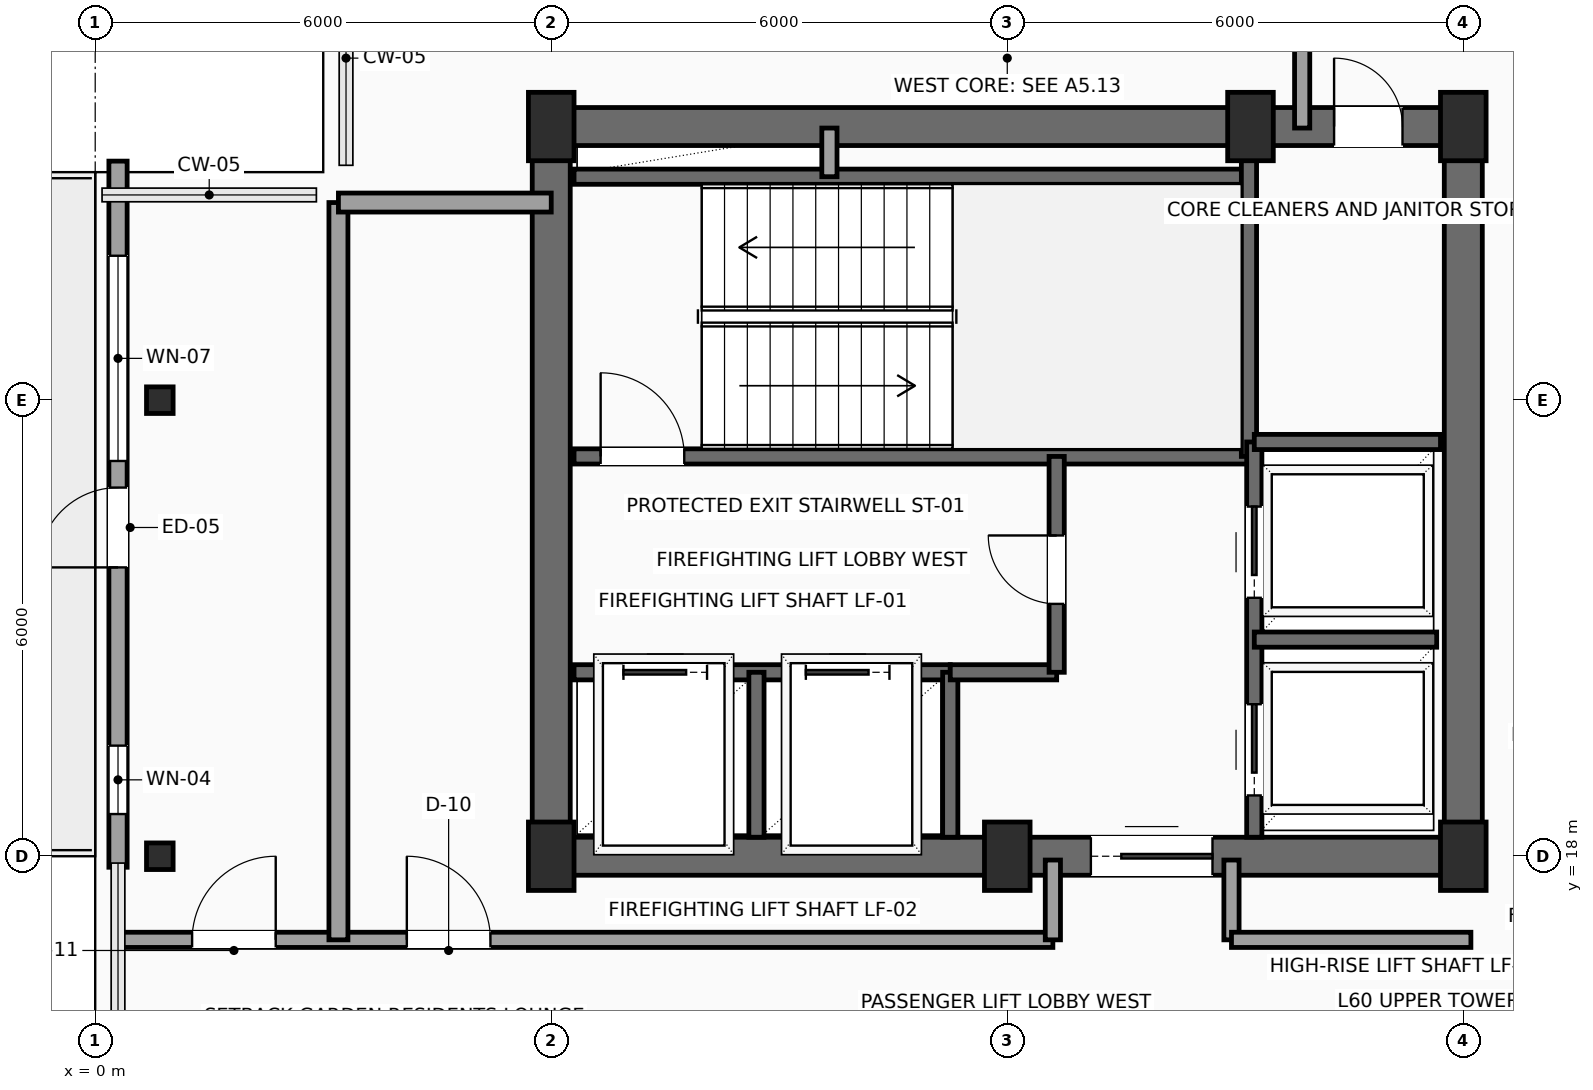
"""IFC4 building model, lengths in metres.
Left out: names, types, materials, properties, quantities, classifications, styles, units other than length and angle.
Written with IfcOpenShell. Run it as: python <this file> out.ifc"""

import sys

from ifc_helpers import new_model, si_unit, direction, frame, frame_2d, origin, origin_2d, place, context, subcontext, project, spatial, rectangle, hollow_rectangle, extrude, element, fill, save


model = new_model("IFC4")
c1 = context("Model", 3, precision=1e-05, world=origin(), true_north=direction((0.0, 1.0)))
c2 = subcontext(c1, "Body", "Model", "MODEL_VIEW")
j1 = project(units=[si_unit("LENGTHUNIT", "METRE"), si_unit("PLANEANGLEUNIT", "RADIAN")], contexts=[c1])
p1 = place(None, origin())
s1 = spatial("IfcSite", under=j1, at=p1, CompositionType="ELEMENT")
p2 = place(p1, origin())
s2 = spatial("IfcBuilding", under=s1, at=p2, CompositionType="ELEMENT")
p3 = place(p2, frame((0.0, 0.0, 243.2)))
s3 = spatial("IfcBuildingStorey", under=s2, at=p3, CompositionType="ELEMENT", Elevation=243.2)
for number, where, z_axis, x_axis in (
    (1, (6.0, 18.0, 0.0), (0.0, 0.0, 1.0), (1.0, 0.0, 0.0)),
    (2, (12.0, 18.0, 0.0), (0.0, 0.0, 1.0), (1.0, 0.0, 0.0)),
    (3, (18.0, 18.0, 0.0), (0.0, 0.0, 1.0), (1.0, 0.0, 0.0)),
    (4, (6.0, 27.6, 0.0), (0.0, 0.0, 1.0), (1.0, 0.0, 0.0)),
    (5, (15.2, 27.6, 0.0), (0.0, 0.0, 1.0), (1.0, 0.0, 0.0)),
    (6, (18.0, 27.6, 0.0), (0.0, 0.0, 1.0), (1.0, 0.0, 0.0)),
):
    element("IfcColumn", number, at=place(p3, frame(where, z_axis=z_axis, x_axis=x_axis)), inside=s3, PredefinedType="COLUMN", context=c2, shape_type="SweptSolid", body=[
        extrude(rectangle(XDim=0.6, YDim=0.9, at=origin_2d()), origin(), (0.0, 0.0, 1.0), 3.5),
    ])
for number, where, z_axis, x_axis in (
    (7, (0.85, 18.0, 0.0), (0.0, 0.0, 1.0), (1.0, 0.0, 0.0)),
    (8, (0.85, 24.0, 0.0), (0.0, 0.0, 1.0), (1.0, 0.0, 0.0)),
):
    element("IfcColumn", number, at=place(p3, frame(where, z_axis=z_axis, x_axis=x_axis)), inside=s3, PredefinedType="COLUMN", context=c2, shape_type="SweptSolid", body=[
        extrude(hollow_rectangle(XDim=0.35, YDim=0.35, WallThickness=0.016, InnerFilletRadius=0.016, OuterFilletRadius=0.032, at=origin_2d()), origin(), (0.0, 0.0, 1.0), 3.5),
    ])
p4 = place(p3, frame((0.3, 17.855, 0.0), z_axis=(0.0, 0.0, 1.0), x_axis=(0.0, 1.0, 0.0)))
e9 = element("IfcWall", 9, at=p4, inside=s3, PredefinedType="SOLIDWALL", context=c2, shape_type="SweptSolid", body=[
    extrude(rectangle(XDim=9.29, YDim=0.24, at=frame_2d((4.645, 0.0))), origin(), (0.0, 0.0, 1.0), 3.3),
])
p5 = place(p4, frame((3.945, 0.0, 0.0)))
e10 = element("IfcOpeningElement", 10, at=p5, cuts=e9, PredefinedType="OPENING", context=c2, shape_type="SweptSolid", body=[
    extrude(rectangle(XDim=1.05, YDim=2.2, at=frame_2d((0.525, 1.1))), frame((0.0, 0.13, 0.0), z_axis=(0.0, -1.0, 0.0), x_axis=(1.0, 0.0, 0.0)), (0.0, 0.0, 1.0), 0.26),
])
p6 = place(p4, frame((5.345, 0.0, 0.6)))
e11 = element("IfcOpeningElement", 11, at=p6, cuts=e9, PredefinedType="OPENING", context=c2, shape_type="SweptSolid", body=[
    extrude(rectangle(XDim=2.7, YDim=2.3, at=frame_2d((1.35, 1.15))), frame((0.0, 0.13, 0.0), z_axis=(0.0, -1.0, 0.0), x_axis=(1.0, 0.0, 0.0)), (0.0, 0.0, 1.0), 0.26),
])
p7 = place(p4, frame((0.7, 0.0, 0.6)))
e12 = element("IfcOpeningElement", 12, at=p7, cuts=e9, PredefinedType="OPENING", context=c2, shape_type="SweptSolid", body=[
    extrude(rectangle(XDim=0.9, YDim=2.2, at=frame_2d((0.45, 1.1))), frame((0.0, 0.13, 0.0), z_axis=(0.0, -1.0, 0.0), x_axis=(1.0, 0.0, 0.0)), (0.0, 0.0, 1.0), 0.26),
])
p8 = place(p3, frame((6.0, 18.0, 0.0), z_axis=(0.0, 0.0, 1.0), x_axis=(1.0, 0.0, 0.0)))
e13 = element("IfcWall", 13, at=p8, inside=s3, PredefinedType="SHEAR", context=c2, shape_type="SweptSolid", body=[
    extrude(rectangle(XDim=12.0, YDim=0.5, at=frame_2d((6.0, 0.0))), origin(), (0.0, 0.0, 1.0), 3.3),
])
p9 = place(p8, frame((7.1, 0.0, 0.0)))
e14 = element("IfcOpeningElement", 14, at=p9, cuts=e13, PredefinedType="OPENING", context=c2, shape_type="SweptSolid", body=[
    extrude(rectangle(XDim=1.6, YDim=2.3, at=frame_2d((0.8, 1.15))), frame((0.0, 0.26, 0.0), z_axis=(0.0, -1.0, 0.0), x_axis=(1.0, 0.0, 0.0)), (0.0, 0.0, 1.0), 0.52),
])
p10 = place(p3, frame((6.0, 27.6, 0.0), z_axis=(0.0, 0.0, 1.0), x_axis=(1.0, 0.0, 0.0)))
e15 = element("IfcWall", 15, at=p10, inside=s3, PredefinedType="SHEAR", context=c2, shape_type="SweptSolid", body=[
    extrude(rectangle(XDim=12.0, YDim=0.5, at=frame_2d((6.0, 0.0))), origin(), (0.0, 0.0, 1.0), 3.3),
])
p11 = place(p10, frame((10.3, 0.0, 0.0)))
e16 = element("IfcOpeningElement", 16, at=p11, cuts=e15, PredefinedType="OPENING", context=c2, shape_type="SweptSolid", body=[
    extrude(rectangle(XDim=0.9, YDim=2.15, at=frame_2d((0.45, 1.075))), frame((0.0, 0.26, 0.0), z_axis=(0.0, -1.0, 0.0), x_axis=(1.0, 0.0, 0.0)), (0.0, 0.0, 1.0), 0.52),
])
for number, where, z_axis, x_axis in (
    (17, (6.0, 18.0, 0.0), (0.0, 0.0, 1.0), (0.0, 1.0, 0.0)),
    (18, (18.0, 18.0, 0.0), (0.0, 0.0, 1.0), (0.0, 1.0, 0.0)),
):
    element("IfcWall", number, at=place(p3, frame(where, z_axis=z_axis, x_axis=x_axis)), inside=s3, PredefinedType="SHEAR", context=c2, shape_type="SweptSolid", body=[
        extrude(rectangle(XDim=9.6, YDim=0.5, at=frame_2d((4.8, 0.0))), origin(), (0.0, 0.0, 1.0), 3.3),
    ])
p12 = place(p3, frame((6.3, 23.26, 0.0), z_axis=(0.0, 0.0, 1.0), x_axis=(1.0, 0.0, 0.0)))
e19 = element("IfcWall", 19, at=p12, inside=s3, PredefinedType="SHEAR", context=c2, shape_type="SweptSolid", body=[
    extrude(rectangle(XDim=8.88, YDim=0.2, at=frame_2d((4.44, 0.0))), origin(), (0.0, 0.0, 1.0), 3.3),
])
p13 = place(p12, frame((0.35, 0.0, 0.0)))
e20 = element("IfcOpeningElement", 20, at=p13, cuts=e19, PredefinedType="OPENING", context=c2, shape_type="SweptSolid", body=[
    extrude(rectangle(XDim=1.1, YDim=2.2, at=frame_2d((0.55, 1.1))), frame((0.0, 0.11, 0.0), z_axis=(0.0, -1.0, 0.0), x_axis=(1.0, 0.0, 0.0)), (0.0, 0.0, 1.0), 0.22),
])
p14 = place(p3, frame((6.3, 26.94, 0.0), z_axis=(0.0, 0.0, 1.0), x_axis=(1.0, 0.0, 0.0)))
e21 = element("IfcWall", 21, at=p14, inside=s3, PredefinedType="SHEAR", context=c2, shape_type="SweptSolid", body=[
    extrude(rectangle(XDim=8.88, YDim=0.2, at=frame_2d((4.44, 0.0))), origin(), (0.0, 0.0, 1.0), 3.3),
])
p15 = place(p3, frame((15.18, 23.26, 0.0), z_axis=(0.0, 0.0, 1.0), x_axis=(0.0, 1.0, 0.0)))
e22 = element("IfcWall", 22, at=p15, inside=s3, PredefinedType="SHEAR", context=c2, shape_type="SweptSolid", body=[
    extrude(rectangle(XDim=4.04, YDim=0.2, at=frame_2d((2.02, 0.0))), origin(), (0.0, 0.0, 1.0), 3.3),
])
p16 = place(p3, frame((6.3, 20.42, 0.0), z_axis=(0.0, 0.0, 1.0), x_axis=(1.0, 0.0, 0.0)))
e23 = element("IfcWall", 23, at=p16, inside=s3, PredefinedType="SHEAR", context=c2, shape_type="SweptSolid", body=[
    extrude(rectangle(XDim=4.95, YDim=0.2, at=frame_2d((2.475, 0.0))), origin(), (0.0, 0.0, 1.0), 3.3),
])
p17 = place(p16, frame((0.65, 0.0, 0.0)))
e24 = element("IfcOpeningElement", 24, at=p17, cuts=e23, PredefinedType="OPENING", context=c2, shape_type="SweptSolid", body=[
    extrude(rectangle(XDim=1.1, YDim=2.2, at=frame_2d((0.55, 1.1))), frame((0.0, 0.11, 0.0), z_axis=(0.0, -1.0, 0.0), x_axis=(1.0, 0.0, 0.0)), (0.0, 0.0, 1.0), 0.22),
])
p18 = place(p16, frame((3.05, 0.0, 0.0)))
e25 = element("IfcOpeningElement", 25, at=p18, cuts=e23, PredefinedType="OPENING", context=c2, shape_type="SweptSolid", body=[
    extrude(rectangle(XDim=1.1, YDim=2.2, at=frame_2d((0.55, 1.1))), frame((0.0, 0.11, 0.0), z_axis=(0.0, -1.0, 0.0), x_axis=(1.0, 0.0, 0.0)), (0.0, 0.0, 1.0), 0.22),
])
for number, where, z_axis, x_axis in (
    (26, (8.7, 18.25, 0.0), (0.0, 0.0, 1.0), (0.0, 1.0, 0.0)),
    (27, (11.25, 18.25, 0.0), (0.0, 0.0, 1.0), (0.0, 1.0, 0.0)),
):
    element("IfcWall", number, at=place(p3, frame(where, z_axis=z_axis, x_axis=x_axis)), inside=s3, PredefinedType="SHEAR", context=c2, shape_type="SweptSolid", body=[
        extrude(rectangle(XDim=2.17, YDim=0.2, at=frame_2d((1.085, 0.0))), origin(), (0.0, 0.0, 1.0), 3.3),
    ])
p19 = place(p3, frame((11.25, 20.42, 0.0), z_axis=(0.0, 0.0, 1.0), x_axis=(1.0, 0.0, 0.0)))
e28 = element("IfcWall", 28, at=p19, inside=s3, PredefinedType="SHEAR", context=c2, shape_type="SweptSolid", body=[
    extrude(rectangle(XDim=1.4, YDim=0.2, at=frame_2d((0.7, 0.0))), origin(), (0.0, 0.0, 1.0), 3.3),
])
p20 = place(p3, frame((12.65, 20.42, 0.0), z_axis=(0.0, 0.0, 1.0), x_axis=(0.0, 1.0, 0.0)))
e29 = element("IfcWall", 29, at=p20, inside=s3, PredefinedType="SHEAR", context=c2, shape_type="SweptSolid", body=[
    extrude(rectangle(XDim=2.84, YDim=0.2, at=frame_2d((1.42, 0.0))), origin(), (0.0, 0.0, 1.0), 3.3),
])
p21 = place(p20, frame((0.9, 0.0, 0.0)))
e30 = element("IfcOpeningElement", 30, at=p21, cuts=e29, PredefinedType="OPENING", context=c2, shape_type="SweptSolid", body=[
    extrude(rectangle(XDim=0.9, YDim=2.15, at=frame_2d((0.45, 1.075))), frame((0.0, 0.11, 0.0), z_axis=(0.0, -1.0, 0.0), x_axis=(1.0, 0.0, 0.0)), (0.0, 0.0, 1.0), 0.22),
])
p22 = place(p3, frame((9.66, 26.94, 0.0), z_axis=(0.0, 0.0, 1.0), x_axis=(0.0, 1.0, 0.0)))
e31 = element("IfcWall", 31, at=p22, inside=s3, PredefinedType="SOLIDWALL", context=c2, shape_type="SweptSolid", body=[
    extrude(rectangle(XDim=0.64, YDim=0.2, at=frame_2d((0.32, 0.0))), origin(), (0.0, 0.0, 1.0), 3.3),
])
p23 = place(p3, frame((15.25, 18.25, 0.0), z_axis=(0.0, 0.0, 1.0), x_axis=(0.0, 1.0, 0.0)))
e32 = element("IfcWall", 32, at=p23, inside=s3, PredefinedType="SHEAR", context=c2, shape_type="SweptSolid", body=[
    extrude(rectangle(XDim=5.2, YDim=0.2, at=frame_2d((2.6, 0.0))), origin(), (0.0, 0.0, 1.0), 3.3),
])
p24 = place(p23, frame((0.55, 0.0, 0.0)))
e33 = element("IfcOpeningElement", 33, at=p24, cuts=e32, PredefinedType="OPENING", context=c2, shape_type="SweptSolid", body=[
    extrude(rectangle(XDim=1.2, YDim=2.2, at=frame_2d((0.6, 1.1))), frame((0.0, 0.11, 0.0), z_axis=(0.0, -1.0, 0.0), x_axis=(1.0, 0.0, 0.0)), (0.0, 0.0, 1.0), 0.22),
])
p25 = place(p23, frame((3.15, 0.0, 0.0)))
e34 = element("IfcOpeningElement", 34, at=p25, cuts=e32, PredefinedType="OPENING", context=c2, shape_type="SweptSolid", body=[
    extrude(rectangle(XDim=1.2, YDim=2.2, at=frame_2d((0.6, 1.1))), frame((0.0, 0.11, 0.0), z_axis=(0.0, -1.0, 0.0), x_axis=(1.0, 0.0, 0.0)), (0.0, 0.0, 1.0), 0.22),
])
p26 = place(p3, frame((15.25, 20.85, 0.0), z_axis=(0.0, 0.0, 1.0), x_axis=(1.0, 0.0, 0.0)))
e35 = element("IfcWall", 35, at=p26, inside=s3, PredefinedType="SHEAR", context=c2, shape_type="SweptSolid", body=[
    extrude(rectangle(XDim=2.4, YDim=0.2, at=frame_2d((1.2, 0.0))), origin(), (0.0, 0.0, 1.0), 3.3),
])
p27 = place(p3, frame((15.25, 23.45, 0.0), z_axis=(0.0, 0.0, 1.0), x_axis=(1.0, 0.0, 0.0)))
e36 = element("IfcWall", 36, at=p27, inside=s3, PredefinedType="SHEAR", context=c2, shape_type="SweptSolid", body=[
    extrude(rectangle(XDim=2.45, YDim=0.2, at=frame_2d((1.225, 0.0))), origin(), (0.0, 0.0, 1.0), 3.3),
])
p28 = place(p3, frame((0.3, 16.9, 0.0), z_axis=(0.0, 0.0, 1.0), x_axis=(1.0, 0.0, 0.0)))
e37 = element("IfcWall", 37, at=p28, inside=s3, PredefinedType="PARTITIONING", context=c2, shape_type="SweptSolid", body=[
    extrude(rectangle(XDim=12.3, YDim=0.2, at=frame_2d((6.15, 0.0))), origin(), (0.0, 0.0, 1.0), 3.3),
])
p29 = place(p28, frame((0.975, 0.0, 0.0)))
e38 = element("IfcOpeningElement", 38, at=p29, cuts=e37, PredefinedType="OPENING", context=c2, shape_type="SweptSolid", body=[
    extrude(rectangle(XDim=1.1, YDim=2.25, at=frame_2d((0.55, 1.125))), frame((0.0, 0.11, 0.0), z_axis=(0.0, -1.0, 0.0), x_axis=(1.0, 0.0, 0.0)), (0.0, 0.0, 1.0), 0.22),
])
p30 = place(p28, frame((3.8, 0.0, 0.0)))
e39 = element("IfcOpeningElement", 39, at=p30, cuts=e37, PredefinedType="OPENING", context=c2, shape_type="SweptSolid", body=[
    extrude(rectangle(XDim=1.1, YDim=2.25, at=frame_2d((0.55, 1.125))), frame((0.0, 0.11, 0.0), z_axis=(0.0, -1.0, 0.0), x_axis=(1.0, 0.0, 0.0)), (0.0, 0.0, 1.0), 0.22),
])
for number, where, z_axis, x_axis in (
    (40, (12.6, 16.9, 0.0), (0.0, 0.0, 1.0), (0.0, 1.0, 0.0)),
    (41, (14.95, 17.95, 0.0), (0.0, 0.0, 1.0), (0.0, -1.0, 0.0)),
):
    element("IfcWall", number, at=place(p3, frame(where, z_axis=z_axis, x_axis=x_axis)), inside=s3, PredefinedType="PARTITIONING", context=c2, shape_type="SweptSolid", body=[
        extrude(rectangle(XDim=1.05, YDim=0.2, at=frame_2d((0.525, 0.0))), origin(), (0.0, 0.0, 1.0), 3.3),
    ])
p31 = place(p3, frame((14.95, 16.9, 0.0), z_axis=(0.0, 0.0, 1.0), x_axis=(1.0, 0.0, 0.0)))
e42 = element("IfcWall", 42, at=p31, inside=s3, PredefinedType="PARTITIONING", context=c2, shape_type="SweptSolid", body=[
    extrude(rectangle(XDim=3.15, YDim=0.2, at=frame_2d((1.575, 0.0))), origin(), (0.0, 0.0, 1.0), 3.3),
])
p32 = place(p3, frame((15.88, 27.58, 0.0), z_axis=(0.0, 0.0, 1.0), x_axis=(0.0, 1.0, 0.0)))
e43 = element("IfcWall", 43, at=p32, inside=s3, PredefinedType="PARTITIONING", context=c2, shape_type="SweptSolid", body=[
    extrude(rectangle(XDim=2.12, YDim=0.2, at=frame_2d((1.06, 0.0))), origin(), (0.0, 0.0, 1.0), 3.3),
])
p33 = place(p3, frame((3.2, 16.9, 0.0), z_axis=(0.0, 0.0, 1.0), x_axis=(0.0, 1.0, 0.0)))
e44 = element("IfcWall", 44, at=p33, inside=s3, PredefinedType="PARTITIONING", context=c2, shape_type="SweptSolid", body=[
    extrude(rectangle(XDim=9.7, YDim=0.25, at=frame_2d((4.85, 0.0))), origin(), (0.0, 0.0, 1.0), 3.3),
])
p34 = place(p3, frame((3.2, 26.6, 0.0), z_axis=(0.0, 0.0, 1.0), x_axis=(1.0, 0.0, 0.0)))
e45 = element("IfcWall", 45, at=p34, inside=s3, PredefinedType="PARTITIONING", context=c2, shape_type="SweptSolid", body=[
    extrude(rectangle(XDim=2.8, YDim=0.25, at=frame_2d((1.4, 0.0))), origin(), (0.0, 0.0, 1.0), 3.3),
])
p35 = place(p5, origin())
e46 = element("IfcDoor", 46, at=p35, inside=s3, OperationType="SINGLE_SWING_LEFT", PredefinedType="DOOR", context=c2, shape_type="SweptSolid", body=[
    extrude(rectangle(XDim=1.05, YDim=2.2, at=frame_2d((0.525, 1.1))), frame((0.0, 0.025, 0.0), z_axis=(0.0, -1.0, 0.0), x_axis=(1.0, 0.0, 0.0)), (0.0, 0.0, 1.0), 0.05),
])
fill(e10, e46)
p36 = place(p6, origin())
e47 = element("IfcWindow", 47, at=p36, inside=s3, PartitioningType="SINGLE_PANEL", PredefinedType="WINDOW", context=c2, shape_type="SweptSolid", body=[
    extrude(rectangle(XDim=2.7, YDim=2.3, at=frame_2d((1.35, 1.15))), frame((0.0, 0.03, 0.0), z_axis=(0.0, -1.0, 0.0), x_axis=(1.0, 0.0, 0.0)), (0.0, 0.0, 1.0), 0.06),
])
fill(e11, e47)
p37 = place(p7, origin())
e48 = element("IfcWindow", 48, at=p37, inside=s3, PartitioningType="SINGLE_PANEL", PredefinedType="WINDOW", context=c2, shape_type="SweptSolid", body=[
    extrude(rectangle(XDim=0.9, YDim=2.2, at=frame_2d((0.45, 1.1))), frame((0.0, 0.03, 0.0), z_axis=(0.0, -1.0, 0.0), x_axis=(1.0, 0.0, 0.0)), (0.0, 0.0, 1.0), 0.06),
])
fill(e12, e48)
p38 = place(p9, origin())
e49 = element("IfcDoor", 49, at=p38, inside=s3, OperationType="DOUBLE_DOOR_SLIDING", PredefinedType="DOOR", context=c2, shape_type="SweptSolid", body=[
    extrude(rectangle(XDim=1.6, YDim=2.3, at=frame_2d((0.8, 1.15))), frame((0.0, 0.025, 0.0), z_axis=(0.0, -1.0, 0.0), x_axis=(1.0, 0.0, 0.0)), (0.0, 0.0, 1.0), 0.05),
])
fill(e14, e49)
p39 = place(p11, origin())
e50 = element("IfcDoor", 50, at=p39, inside=s3, OperationType="SINGLE_SWING_LEFT", PredefinedType="DOOR", context=c2, shape_type="SweptSolid", body=[
    extrude(rectangle(XDim=0.9, YDim=2.15, at=frame_2d((0.45, 1.075))), frame((0.0, 0.025, 0.0), z_axis=(0.0, -1.0, 0.0), x_axis=(1.0, 0.0, 0.0)), (0.0, 0.0, 1.0), 0.05),
])
fill(e16, e50)
p40 = place(p13, origin())
e51 = element("IfcDoor", 51, at=p40, inside=s3, OperationType="SINGLE_SWING_LEFT", PredefinedType="DOOR", context=c2, shape_type="SweptSolid", body=[
    extrude(rectangle(XDim=1.1, YDim=2.2, at=frame_2d((0.55, 1.1))), frame((0.0, 0.025, 0.0), z_axis=(0.0, -1.0, 0.0), x_axis=(1.0, 0.0, 0.0)), (0.0, 0.0, 1.0), 0.05),
])
fill(e20, e51)
p41 = place(p17, origin())
e52 = element("IfcDoor", 52, at=p41, inside=s3, OperationType="SLIDING_TO_LEFT", PredefinedType="DOOR", context=c2, shape_type="SweptSolid", body=[
    extrude(rectangle(XDim=1.1, YDim=2.2, at=frame_2d((0.55, 1.1))), frame((0.0, 0.025, 0.0), z_axis=(0.0, -1.0, 0.0), x_axis=(1.0, 0.0, 0.0)), (0.0, 0.0, 1.0), 0.05),
])
fill(e24, e52)
p42 = place(p18, origin())
e53 = element("IfcDoor", 53, at=p42, inside=s3, OperationType="SLIDING_TO_LEFT", PredefinedType="DOOR", context=c2, shape_type="SweptSolid", body=[
    extrude(rectangle(XDim=1.1, YDim=2.2, at=frame_2d((0.55, 1.1))), frame((0.0, 0.025, 0.0), z_axis=(0.0, -1.0, 0.0), x_axis=(1.0, 0.0, 0.0)), (0.0, 0.0, 1.0), 0.05),
])
fill(e25, e53)
p43 = place(p21, origin())
e54 = element("IfcDoor", 54, at=p43, inside=s3, OperationType="SINGLE_SWING_RIGHT", PredefinedType="DOOR", context=c2, shape_type="SweptSolid", body=[
    extrude(rectangle(XDim=0.9, YDim=2.15, at=frame_2d((0.45, 1.075))), frame((0.0, 0.025, 0.0), z_axis=(0.0, -1.0, 0.0), x_axis=(1.0, 0.0, 0.0)), (0.0, 0.0, 1.0), 0.05),
])
fill(e30, e54)
p44 = place(p24, origin())
e55 = element("IfcDoor", 55, at=p44, inside=s3, OperationType="SLIDING_TO_RIGHT", PredefinedType="DOOR", context=c2, shape_type="SweptSolid", body=[
    extrude(rectangle(XDim=1.2, YDim=2.2, at=frame_2d((0.6, 1.1))), frame((0.0, 0.025, 0.0), z_axis=(0.0, -1.0, 0.0), x_axis=(1.0, 0.0, 0.0)), (0.0, 0.0, 1.0), 0.05),
])
fill(e33, e55)
p45 = place(p25, origin())
e56 = element("IfcDoor", 56, at=p45, inside=s3, OperationType="SLIDING_TO_RIGHT", PredefinedType="DOOR", context=c2, shape_type="SweptSolid", body=[
    extrude(rectangle(XDim=1.2, YDim=2.2, at=frame_2d((0.6, 1.1))), frame((0.0, 0.025, 0.0), z_axis=(0.0, -1.0, 0.0), x_axis=(1.0, 0.0, 0.0)), (0.0, 0.0, 1.0), 0.05),
])
fill(e34, e56)
p46 = place(p29, origin())
e57 = element("IfcDoor", 57, at=p46, inside=s3, OperationType="SINGLE_SWING_RIGHT", PredefinedType="DOOR", context=c2, shape_type="SweptSolid", body=[
    extrude(rectangle(XDim=1.1, YDim=2.25, at=frame_2d((0.55, 1.125))), frame((0.0, 0.025, 0.0), z_axis=(0.0, -1.0, 0.0), x_axis=(1.0, 0.0, 0.0)), (0.0, 0.0, 1.0), 0.05),
])
fill(e38, e57)
p47 = place(p30, origin())
e58 = element("IfcDoor", 58, at=p47, inside=s3, OperationType="SINGLE_SWING_LEFT", PredefinedType="DOOR", context=c2, shape_type="SweptSolid", body=[
    extrude(rectangle(XDim=1.1, YDim=2.25, at=frame_2d((0.55, 1.125))), frame((0.0, 0.025, 0.0), z_axis=(0.0, -1.0, 0.0), x_axis=(1.0, 0.0, 0.0)), (0.0, 0.0, 1.0), 0.05),
])
fill(e39, e58)
save(model, sys.argv[1])
